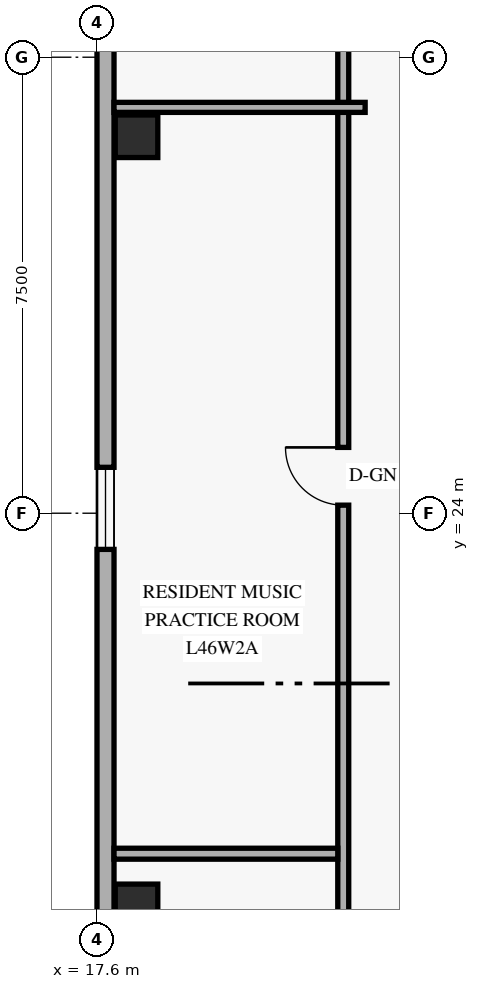
"""IFC4 building model, lengths in metres.
Left out: names, types, materials, properties, quantities, classifications, styles, units other than length and angle.
Written with IfcOpenShell. Run it as: python <this file> out.ifc"""

import sys

from ifc_helpers import new_model, si_unit, direction, frame, frame_2d, origin, origin_2d, place, context, subcontext, project, spatial, rectangle, extrude, element, fill, save


model = new_model("IFC4")
c1 = context("Model", 3, precision=1e-05, world=origin(), true_north=direction((0.0, 1.0)))
c2 = subcontext(c1, "Body", "Model", "MODEL_VIEW")
j1 = project(units=[si_unit("LENGTHUNIT", "METRE"), si_unit("PLANEANGLEUNIT", "RADIAN")], contexts=[c1])
p1 = place(None, origin())
s1 = spatial("IfcSite", under=j1, at=p1, CompositionType="ELEMENT")
p2 = place(p1, origin())
s2 = spatial("IfcBuilding", under=s1, at=p2, CompositionType="ELEMENT")
p3 = place(p2, frame((0.0, 0.0, 177.6)))
s3 = spatial("IfcBuildingStorey", under=s2, at=p3, CompositionType="ELEMENT", Elevation=177.6)
for number, where, z_axis, x_axis in (
    (1, (18.25, 17.55, 0.0), (0.0, 0.0, 1.0), (1.0, 0.0, 0.0)),
    (2, (18.25, 30.2, 0.0), (0.0, 0.0, 1.0), (1.0, 0.0, 0.0)),
):
    element("IfcColumn", number, at=place(p3, frame(where, z_axis=z_axis, x_axis=x_axis)), inside=s3, PredefinedType="COLUMN", context=c2, shape_type="SweptSolid", body=[
        extrude(rectangle(XDim=0.7, YDim=0.7, at=origin_2d()), origin(), (0.0, 0.0, 1.0), 3.6),
    ])
p4 = place(p3, frame((17.74, 40.38, 0.0), z_axis=(0.0, 0.0, 1.0), x_axis=(0.0, -1.0, 0.0)))
e3 = element("IfcWall", 3, at=p4, inside=s3, PredefinedType="SOLIDWALL", context=c2, shape_type="SweptSolid", body=[
    extrude(rectangle(XDim=32.76, YDim=0.28, at=frame_2d((16.38, 0.0))), origin(), (0.0, 0.0, 1.0), 3.36),
])
p5 = place(p4, frame((28.998, 0.0, 0.85)))
e4 = element("IfcOpeningElement", 4, at=p5, cuts=e3, PredefinedType="OPENING", context=c2, shape_type="SweptSolid", body=[
    extrude(rectangle(XDim=1.35, YDim=1.55, at=frame_2d((0.675, 0.775))), frame((0.0, 0.15, 0.0), z_axis=(0.0, -1.0, 0.0), x_axis=(1.0, 0.0, 0.0)), (0.0, 0.0, 1.0), 0.3),
])
p6 = place(p4, frame((25.288, 0.0, 0.85)))
e5 = element("IfcOpeningElement", 5, at=p6, cuts=e3, PredefinedType="OPENING", context=c2, shape_type="SweptSolid", body=[
    extrude(rectangle(XDim=1.35, YDim=1.55, at=frame_2d((0.675, 0.775))), frame((0.0, 0.15, 0.0), z_axis=(0.0, -1.0, 0.0), x_axis=(1.0, 0.0, 0.0)), (0.0, 0.0, 1.0), 0.3),
])
p7 = place(p4, frame((15.625, 0.0, 0.85)))
e6 = element("IfcOpeningElement", 6, at=p7, cuts=e3, PredefinedType="OPENING", context=c2, shape_type="SweptSolid", body=[
    extrude(rectangle(XDim=1.35, YDim=1.55, at=frame_2d((0.675, 0.775))), frame((0.0, 0.15, 0.0), z_axis=(0.0, -1.0, 0.0), x_axis=(1.0, 0.0, 0.0)), (0.0, 0.0, 1.0), 0.3),
])
p8 = place(p4, frame((5.212, 0.0, 0.85)))
e7 = element("IfcOpeningElement", 7, at=p8, cuts=e3, PredefinedType="OPENING", context=c2, shape_type="SweptSolid", body=[
    extrude(rectangle(XDim=1.35, YDim=1.55, at=frame_2d((0.675, 0.775))), frame((0.0, 0.15, 0.0), z_axis=(0.0, -1.0, 0.0), x_axis=(1.0, 0.0, 0.0)), (0.0, 0.0, 1.0), 0.3),
])
p9 = place(p3, frame((21.65, 6.8, 0.0), z_axis=(0.0, 0.0, 1.0), x_axis=(0.0, 1.0, 0.0)))
e8 = element("IfcWall", 8, at=p9, inside=s3, PredefinedType="STANDARD", context=c2, shape_type="SweptSolid", body=[
    extrude(rectangle(XDim=34.4, YDim=0.18, at=frame_2d((17.2, 0.0))), origin(), (0.0, 0.0, 1.0), 2.73),
])
p10 = place(p9, frame((0.732, 0.0, 0.0)))
e9 = element("IfcOpeningElement", 9, at=p10, cuts=e8, PredefinedType="OPENING", context=c2, shape_type="SweptSolid", body=[
    extrude(rectangle(XDim=0.95, YDim=2.15, at=frame_2d((0.475, 1.075))), frame((0.0, 0.1, 0.0), z_axis=(0.0, -1.0, 0.0), x_axis=(1.0, 0.0, 0.0)), (0.0, 0.0, 1.0), 0.2),
])
p11 = place(p9, frame((7.768, 0.0, 0.0)))
e10 = element("IfcOpeningElement", 10, at=p11, cuts=e8, PredefinedType="OPENING", context=c2, shape_type="SweptSolid", body=[
    extrude(rectangle(XDim=0.95, YDim=2.15, at=frame_2d((0.475, 1.075))), frame((0.0, 0.1, 0.0), z_axis=(0.0, -1.0, 0.0), x_axis=(1.0, 0.0, 0.0)), (0.0, 0.0, 1.0), 0.2),
])
p12 = place(p9, frame((17.333, 0.0, 0.0)))
e11 = element("IfcOpeningElement", 11, at=p12, cuts=e8, PredefinedType="OPENING", context=c2, shape_type="SweptSolid", body=[
    extrude(rectangle(XDim=0.95, YDim=2.15, at=frame_2d((0.475, 1.075))), frame((0.0, 0.1, 0.0), z_axis=(0.0, -1.0, 0.0), x_axis=(1.0, 0.0, 0.0)), (0.0, 0.0, 1.0), 0.2),
])
p13 = place(p9, frame((29.968, 0.0, 0.0)))
e12 = element("IfcOpeningElement", 12, at=p13, cuts=e8, PredefinedType="OPENING", context=c2, shape_type="SweptSolid", body=[
    extrude(rectangle(XDim=0.95, YDim=2.15, at=frame_2d((0.475, 1.075))), frame((0.0, 0.1, 0.0), z_axis=(0.0, -1.0, 0.0), x_axis=(1.0, 0.0, 0.0)), (0.0, 0.0, 1.0), 0.2),
])
p14 = place(p3, frame((17.88, 18.4, 0.0), z_axis=(0.0, 0.0, 1.0), x_axis=(1.0, 0.0, 0.0)))
e13 = element("IfcWall", 13, at=p14, inside=s3, PredefinedType="PARTITIONING", context=c2, shape_type="SweptSolid", body=[
    extrude(rectangle(XDim=3.68, YDim=0.18, at=frame_2d((1.84, 0.0))), origin(), (0.0, 0.0, 1.0), 2.879),
])
p15 = place(p3, frame((17.88, 30.675, 0.0), z_axis=(0.0, 0.0, 1.0), x_axis=(1.0, 0.0, 0.0)))
e14 = element("IfcWall", 14, at=p15, inside=s3, PredefinedType="PARTITIONING", context=c2, shape_type="SweptSolid", body=[
    extrude(rectangle(XDim=4.13, YDim=0.165, at=frame_2d((2.065, 0.0))), origin(), (0.0, 0.0, 1.0), 2.879),
])
p16 = place(p7, origin())
e15 = element("IfcWindow", 15, at=p16, inside=s3, PartitioningType="SINGLE_PANEL", PredefinedType="WINDOW", context=c2, shape_type="SweptSolid", body=[
    extrude(rectangle(XDim=1.35, YDim=1.55, at=frame_2d((0.675, 0.775))), frame((0.0, 0.03, 0.0), z_axis=(0.0, -1.0, 0.0), x_axis=(1.0, 0.0, 0.0)), (0.0, 0.0, 1.0), 0.06),
])
fill(e6, e15)
p17 = place(p12, origin())
e16 = element("IfcDoor", 16, at=p17, inside=s3, OperationType="SINGLE_SWING_RIGHT", PredefinedType="DOOR", context=c2, shape_type="SweptSolid", body=[
    extrude(rectangle(XDim=0.95, YDim=2.15, at=frame_2d((0.475, 1.075))), frame((0.0, 0.025, 0.0), z_axis=(0.0, -1.0, 0.0), x_axis=(1.0, 0.0, 0.0)), (0.0, 0.0, 1.0), 0.05),
])
fill(e11, e16)
save(model, sys.argv[1])
